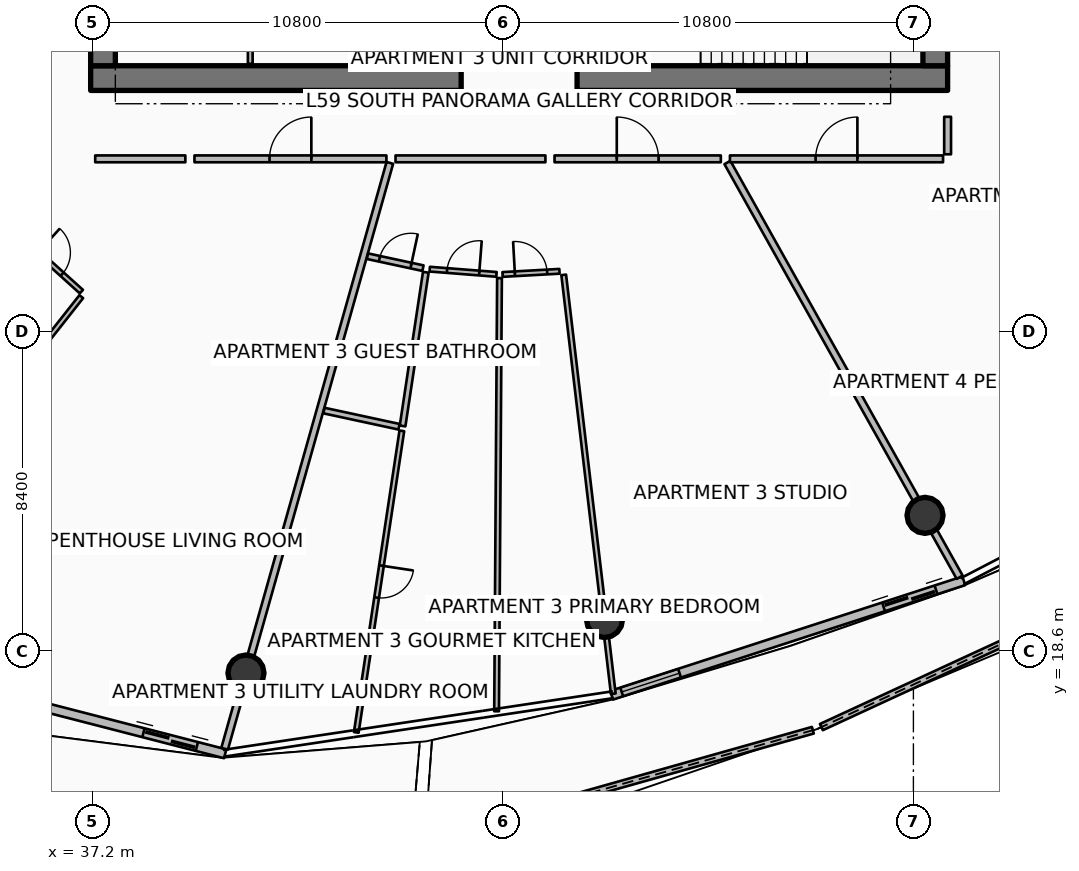
"""IFC4 building model, lengths in metres.
Left out: names, types, materials, properties, quantities, classifications, styles, units other than length and angle.
Written with IfcOpenShell. Run it as: python <this file> out.ifc"""

import sys

from ifc_helpers import new_model, si_unit, direction, frame, frame_2d, origin, origin_2d, place, context, subcontext, project, spatial, polyline, rectangle, circle, outline, extrude, element, fill, save


model = new_model("IFC4")
c1 = context("Model", 3, precision=1e-05, world=origin(), true_north=direction((0.0, 1.0)))
c2 = subcontext(c1, "Body", "Model", "MODEL_VIEW")
j1 = project(units=[si_unit("LENGTHUNIT", "METRE"), si_unit("PLANEANGLEUNIT", "RADIAN")], contexts=[c1])
p1 = place(None, origin())
s1 = spatial("IfcSite", under=j1, at=p1, CompositionType="ELEMENT")
p2 = place(p1, origin())
s2 = spatial("IfcBuilding", under=s1, at=p2, CompositionType="ELEMENT")
p3 = place(p2, frame((0.0, 0.0, 236.7)))
s3 = spatial("IfcBuildingStorey", under=s2, at=p3, CompositionType="ELEMENT", Elevation=236.7)
for number, where, z_axis, x_axis in (
    (1, (37.15, 33.675, 0.0), (0.0, 0.0, 1.0), (1.0, 0.0, 0.0)),
    (2, (49.95, 33.675, 0.0), (0.0, 0.0, 1.0), (1.0, 0.0, 0.0)),
):
    element("IfcWall", number, at=place(p3, frame(where, z_axis=z_axis, x_axis=x_axis)), inside=s3, PredefinedType="SHEAR", context=c2, shape_type="SweptSolid", body=[
        extrude(rectangle(XDim=9.75, YDim=0.65, at=frame_2d((4.875, 0.0))), origin(), (0.0, 0.0, 1.0), 3.85),
    ])
for number, where, z_axis, x_axis in (
    (3, (37.475, 34.0, 0.0), (0.0, 0.0, 1.0), (0.0, 1.0, 0.0)),
    (4, (59.375, 34.0, 0.0), (0.0, 0.0, 1.0), (0.0, 1.0, 0.0)),
):
    element("IfcWall", number, at=place(p3, frame(where, z_axis=z_axis, x_axis=x_axis)), inside=s3, PredefinedType="SHEAR", context=c2, shape_type="SweptSolid", body=[
        extrude(rectangle(XDim=16.0, YDim=0.65, at=frame_2d((8.0, 0.0))), origin(), (0.0, 0.0, 1.0), 3.85),
    ])
p4 = place(p3, frame((51.31, 34.0, 0.0), z_axis=(0.0, 0.0, 1.0), x_axis=(0.0, 1.0, 0.0)))
e5 = element("IfcWall", 5, at=p4, inside=s3, PredefinedType="SHEAR", context=c2, shape_type="SweptSolid", body=[
    extrude(rectangle(XDim=3.5, YDim=0.28, at=frame_2d((1.75, 0.0))), origin(), (0.0, 0.0, 1.0), 3.85),
])
for number, where, z_axis, x_axis in (
    (6, (41.237, 18.021, 0.0), (0.0, 0.0, 1.0), (1.0, 0.0, 0.0)),
    (7, (50.671, 19.429, 0.0), (0.0, 0.0, 1.0), (1.0, 0.0, 0.0)),
    (8, (59.105, 22.17, 0.0), (0.0, 0.0, 1.0), (1.0, 0.0, 0.0)),
):
    element("IfcColumn", number, at=place(p3, frame(where, z_axis=z_axis, x_axis=x_axis)), inside=s3, PredefinedType="COLUMN", context=c2, shape_type="SweptSolid", body=[
        extrude(circle(Radius=0.475, at=origin_2d()), origin(), (0.0, 0.0, 1.0), 3.59),
    ])
p5 = place(p3, frame((45.942, 13.635, 0.0), z_axis=(0.0, 0.0, 1.0), x_axis=(0.962462930889, 0.271413165976, 0.0)))
e9 = element("IfcWall", 9, at=p5, inside=s3, PredefinedType="PARAPET", context=c2, shape_type="SweptSolid", body=[
    extrude(outline(polyline([(0.0, 0.0), (10.611, 0.0), (10.611, 1.632), (5.305, 1.798), (0.0, 1.86), (0.0, 0.0)])), frame((0.0, 0.09, 0.0), z_axis=(0.0, -1.0, 0.0), x_axis=(1.0, 0.0, 0.0)), (0.0, 0.0, 1.0), 0.18),
])
p6 = place(p3, frame((56.379, 16.598, 0.0), z_axis=(0.0, 0.0, 1.0), x_axis=(0.907848132744, 0.419299138888, 0.0)))
e10 = element("IfcWall", 10, at=p6, inside=s3, PredefinedType="PARAPET", context=c2, shape_type="SweptSolid", body=[
    extrude(outline(polyline([(0.0, 0.0), (10.344, 0.0), (10.344, 1.233), (5.172, 1.418), (0.0, 1.632), (0.0, 0.0)])), frame((0.0, 0.09, 0.0), z_axis=(0.0, -1.0, 0.0), x_axis=(1.0, 0.0, 0.0)), (0.0, 0.0, 1.0), 0.18),
])
p7 = place(p3, frame((29.614, 18.751, 0.0), z_axis=(0.0, 0.0, 1.0), x_axis=(0.968343758421, -0.249620442927, 0.0)))
e11 = element("IfcWall", 11, at=p7, inside=s3, PredefinedType="SOLIDWALL", context=c2, shape_type="SweptSolid", body=[
    extrude(rectangle(XDim=11.438, YDim=0.24, at=frame_2d((5.719, 0.0))), origin(), (0.0, 0.0, 1.0), 2.54),
])
p8 = place(p7, frame((9.218, 0.0, 0.0)))
e12 = element("IfcOpeningElement", 12, at=p8, cuts=e11, PredefinedType="OPENING", context=c2, shape_type="SweptSolid", body=[
    extrude(rectangle(XDim=1.45, YDim=2.15, at=frame_2d((0.725, 1.075))), frame((0.0, 0.13, 0.0), z_axis=(0.0, -1.0, 0.0), x_axis=(1.0, 0.0, 0.0)), (0.0, 0.0, 1.0), 0.26),
])
p9 = place(p7, frame((0.28, 0.0, 0.65)))
e13 = element("IfcOpeningElement", 13, at=p9, cuts=e11, PredefinedType="OPENING", context=c2, shape_type="SweptSolid", body=[
    extrude(rectangle(XDim=1.6, YDim=1.5, at=frame_2d((0.8, 0.75))), frame((0.0, 0.13, 0.0), z_axis=(0.0, -1.0, 0.0), x_axis=(1.0, 0.0, 0.0)), (0.0, 0.0, 1.0), 0.26),
])
p10 = place(p3, frame((50.858, 17.436, 0.0), z_axis=(0.0, 0.0, 1.0), x_axis=(0.951055974609, 0.309018661507, 0.0)))
e14 = element("IfcWall", 14, at=p10, inside=s3, PredefinedType="SOLIDWALL", context=c2, shape_type="SweptSolid", body=[
    extrude(rectangle(XDim=9.745, YDim=0.24, at=frame_2d((4.873, 0.0))), origin(), (0.0, 0.0, 1.0), 2.54),
])
p11 = place(p10, frame((7.525, 0.0, 0.0)))
e15 = element("IfcOpeningElement", 15, at=p11, cuts=e14, PredefinedType="OPENING", context=c2, shape_type="SweptSolid", body=[
    extrude(rectangle(XDim=1.45, YDim=2.15, at=frame_2d((0.725, 1.075))), frame((0.0, 0.13, 0.0), z_axis=(0.0, -1.0, 0.0), x_axis=(1.0, 0.0, 0.0)), (0.0, 0.0, 1.0), 0.26),
])
p12 = place(p10, frame((0.28, 0.0, 0.65)))
e16 = element("IfcOpeningElement", 16, at=p12, cuts=e14, PredefinedType="OPENING", context=c2, shape_type="SweptSolid", body=[
    extrude(rectangle(XDim=1.6, YDim=1.5, at=frame_2d((0.8, 0.75))), frame((0.0, 0.13, 0.0), z_axis=(0.0, -1.0, 0.0), x_axis=(1.0, 0.0, 0.0)), (0.0, 0.0, 1.0), 0.26),
])
p13 = place(p3, frame((46.58, 34.245, 0.0), z_axis=(0.0, 0.0, 1.0), x_axis=(0.0, 1.0, 0.0)))
e17 = element("IfcWall", 17, at=p13, inside=s3, PredefinedType="PARTITIONING", context=c2, shape_type="SweptSolid", body=[
    extrude(rectangle(XDim=1.71, YDim=0.16, at=frame_2d((0.855, 0.0))), origin(), (0.0, 0.0, 1.0), 3.59),
])
for number, where, z_axis, x_axis in (
    (18, (44.28, 34.05, 0.0), (0.0, 0.0, 1.0), (0.0, 1.0, 0.0)),
    (19, (41.35, 34.05, 0.0), (0.0, 0.0, 1.0), (0.0, 1.0, 0.0)),
):
    element("IfcWall", number, at=place(p3, frame(where, z_axis=z_axis, x_axis=x_axis)), inside=s3, PredefinedType="PARTITIONING", context=c2, shape_type="SweptSolid", body=[
        extrude(rectangle(XDim=2.03, YDim=0.125, at=frame_2d((1.015, 0.0))), origin(), (0.0, 0.0, 1.0), 3.03),
    ])
p14 = place(p3, frame((49.98, 34.06, 0.0), z_axis=(0.0, 0.0, 1.0), x_axis=(0.0, 1.0, 0.0)))
e20 = element("IfcWall", 20, at=p14, inside=s3, PredefinedType="PARTITIONING", context=c2, shape_type="SweptSolid", body=[
    extrude(rectangle(XDim=3.4, YDim=0.125, at=frame_2d((1.7, 0.0))), origin(), (0.0, 0.0, 1.0), 3.03),
])
p15 = place(p3, frame((45.023, 31.444, 0.0), z_axis=(0.0, 0.0, 1.0), x_axis=(-0.271442063103, -0.962454781472, 0.0)))
e21 = element("IfcWall", 21, at=p15, inside=s3, PredefinedType="PARTITIONING", context=c2, shape_type="SweptSolid", body=[
    extrude(rectangle(XDim=16.017, YDim=0.18, at=frame_2d((8.008, 0.0))), origin(), (0.0, 0.0, 1.0), 2.957),
])
p16 = place(p3, frame((53.906, 31.454, 0.0), z_axis=(0.0, 0.0, 1.0), x_axis=(0.48862654941, -0.872493034477, 0.0)))
e22 = element("IfcWall", 22, at=p16, inside=s3, PredefinedType="PARTITIONING", context=c2, shape_type="SweptSolid", body=[
    extrude(rectangle(XDim=12.508, YDim=0.18, at=frame_2d((6.254, 0.0))), origin(), (0.0, 0.0, 1.0), 2.957),
])
p17 = place(p3, frame((39.882, 31.55, 0.0), z_axis=(0.0, 0.0, 1.0), x_axis=(1.0, 0.0, 0.0)))
e23 = element("IfcWall", 23, at=p17, inside=s3, PredefinedType="PARTITIONING", context=c2, shape_type="SweptSolid", body=[
    extrude(rectangle(XDim=5.051, YDim=0.18, at=frame_2d((2.525, 0.0))), origin(), (0.0, 0.0, 1.0), 2.957),
])
p18 = place(p17, frame((1.975, 0.0, 0.0)))
e24 = element("IfcOpeningElement", 24, at=p18, cuts=e23, PredefinedType="OPENING", context=c2, shape_type="SweptSolid", body=[
    extrude(rectangle(XDim=1.1, YDim=2.1, at=frame_2d((0.55, 1.05))), frame((0.0, 0.1, 0.0), z_axis=(0.0, -1.0, 0.0), x_axis=(1.0, 0.0, 0.0)), (0.0, 0.0, 1.0), 0.2),
])
p19 = place(p3, frame((37.27, 31.55, 0.0), z_axis=(0.0, 0.0, 1.0), x_axis=(1.0, 0.0, 0.0)))
e25 = element("IfcWall", 25, at=p19, inside=s3, PredefinedType="PARTITIONING", context=c2, shape_type="SweptSolid", body=[
    extrude(rectangle(XDim=2.372, YDim=0.18, at=frame_2d((1.186, 0.0))), origin(), (0.0, 0.0, 1.0), 2.957),
])
p20 = place(p3, frame((36.903, 27.924, 0.0), z_axis=(0.0, 0.0, 1.0), x_axis=(-0.619090039254, -0.785320013304, 0.0)))
e26 = element("IfcWall", 26, at=p20, inside=s3, PredefinedType="PARTITIONING", context=c2, shape_type="SweptSolid", body=[
    extrude(rectangle(XDim=11.672, YDim=0.125, at=frame_2d((5.836, 0.0))), origin(), (0.0, 0.0, 1.0), 2.957),
])
p21 = place(p3, frame((35.26, 29.542, 0.0), z_axis=(0.0, 0.0, 1.0), x_axis=(0.742286289791, -0.670082878447, 0.0)))
e27 = element("IfcWall", 27, at=p21, inside=s3, PredefinedType="PARTITIONING", context=c2, shape_type="SweptSolid", body=[
    extrude(rectangle(XDim=2.218, YDim=0.125, at=frame_2d((1.109, 0.0))), origin(), (0.0, 0.0, 1.0), 2.957),
])
p22 = place(p21, frame((0.684, 0.0, 0.0)))
e28 = element("IfcOpeningElement", 28, at=p22, cuts=e27, PredefinedType="OPENING", context=c2, shape_type="SweptSolid", body=[
    extrude(rectangle(XDim=0.85, YDim=2.06, at=frame_2d((0.425, 1.03))), frame((0.0, 0.073, 0.0), z_axis=(0.0, -1.0, 0.0), x_axis=(1.0, 0.0, 0.0)), (0.0, 0.0, 1.0), 0.145),
])
p23 = place(p3, frame((49.357, 31.55, 0.0), z_axis=(0.0, 0.0, 1.0), x_axis=(1.0, 0.0, 0.0)))
e29 = element("IfcWall", 29, at=p23, inside=s3, PredefinedType="PARTITIONING", context=c2, shape_type="SweptSolid", body=[
    extrude(rectangle(XDim=4.376, YDim=0.18, at=frame_2d((2.188, 0.0))), origin(), (0.0, 0.0, 1.0), 2.957),
])
p24 = place(p23, frame((1.638, 0.0, 0.0)))
e30 = element("IfcOpeningElement", 30, at=p24, cuts=e29, PredefinedType="OPENING", context=c2, shape_type="SweptSolid", body=[
    extrude(rectangle(XDim=1.1, YDim=2.1, at=frame_2d((0.55, 1.05))), frame((0.0, 0.1, 0.0), z_axis=(0.0, -1.0, 0.0), x_axis=(1.0, 0.0, 0.0)), (0.0, 0.0, 1.0), 0.2),
])
p25 = place(p3, frame((45.173, 31.55, 0.0), z_axis=(0.0, 0.0, 1.0), x_axis=(1.0, 0.0, 0.0)))
e31 = element("IfcWall", 31, at=p25, inside=s3, PredefinedType="PARTITIONING", context=c2, shape_type="SweptSolid", body=[
    extrude(rectangle(XDim=3.944, YDim=0.18, at=frame_2d((1.972, 0.0))), origin(), (0.0, 0.0, 1.0), 2.957),
])
p26 = place(p3, frame((49.598, 28.497, 0.0), z_axis=(0.0, 0.0, 1.0), x_axis=(0.117541965763, -0.99306791625, 0.0)))
e32 = element("IfcWall", 32, at=p26, inside=s3, PredefinedType="PARTITIONING", context=c2, shape_type="SweptSolid", body=[
    extrude(rectangle(XDim=11.098, YDim=0.125, at=frame_2d((5.549, 0.0))), origin(), (0.0, 0.0, 1.0), 2.957),
])
p27 = place(p3, frame((44.434, 28.989, 0.0), z_axis=(0.0, 0.0, 1.0), x_axis=(0.977543483976, -0.21073380587, 0.0)))
e33 = element("IfcWall", 33, at=p27, inside=s3, PredefinedType="PARTITIONING", context=c2, shape_type="SweptSolid", body=[
    extrude(rectangle(XDim=1.494, YDim=0.15, at=frame_2d((0.747, 0.0))), origin(), (0.0, 0.0, 1.0), 2.957),
])
p28 = place(p27, frame((0.322, 0.0, 0.0)))
e34 = element("IfcOpeningElement", 34, at=p28, cuts=e33, PredefinedType="OPENING", context=c2, shape_type="SweptSolid", body=[
    extrude(rectangle(XDim=0.85, YDim=2.06, at=frame_2d((0.425, 1.03))), frame((0.0, 0.085, 0.0), z_axis=(0.0, -1.0, 0.0), x_axis=(1.0, 0.0, 0.0)), (0.0, 0.0, 1.0), 0.17),
])
p29 = place(p3, frame((43.289, 24.927, 0.0), z_axis=(0.0, 0.0, 1.0), x_axis=(0.977523973404, -0.210824290395, 0.0)))
e35 = element("IfcWall", 35, at=p29, inside=s3, PredefinedType="PARTITIONING", context=c2, shape_type="SweptSolid", body=[
    extrude(rectangle(XDim=2.021, YDim=0.15, at=frame_2d((1.01, 0.0))), origin(), (0.0, 0.0, 1.0), 2.957),
])
p30 = place(p3, frame((45.969, 28.566, 0.0), z_axis=(0.0, 0.0, 1.0), x_axis=(-0.149464107942, -0.988767151779, 0.0)))
e36 = element("IfcWall", 36, at=p30, inside=s3, PredefinedType="PARTITIONING", context=c2, shape_type="SweptSolid", body=[
    extrude(rectangle(XDim=4.09, YDim=0.15, at=frame_2d((2.045, 0.0))), origin(), (0.0, 0.0, 1.0), 3.03),
])
p31 = place(p3, frame((45.339, 24.393, 0.0), z_axis=(0.0, 0.0, 1.0), x_axis=(-0.149441267911, -0.988770604056, 0.0)))
e37 = element("IfcWall", 37, at=p31, inside=s3, PredefinedType="PARTITIONING", context=c2, shape_type="SweptSolid", body=[
    extrude(rectangle(XDim=8.025, YDim=0.125, at=frame_2d((4.012, 0.0))), origin(), (0.0, 0.0, 1.0), 3.03),
])
p32 = place(p31, frame((3.587, 0.0, 0.0)))
e38 = element("IfcOpeningElement", 38, at=p32, cuts=e37, PredefinedType="OPENING", context=c2, shape_type="SweptSolid", body=[
    extrude(rectangle(XDim=0.85, YDim=2.06, at=frame_2d((0.425, 1.03))), frame((0.0, 0.073, 0.0), z_axis=(0.0, -1.0, 0.0), x_axis=(1.0, 0.0, 0.0)), (0.0, 0.0, 1.0), 0.145),
])
p33 = place(p3, frame((47.909, 28.413, 0.0), z_axis=(0.0, 0.0, 1.0), x_axis=(-0.006746473149, -0.999977242291, 0.0)))
e39 = element("IfcWall", 39, at=p33, inside=s3, PredefinedType="PARTITIONING", context=c2, shape_type="SweptSolid", body=[
    extrude(rectangle(XDim=11.399, YDim=0.125, at=frame_2d((5.7, 0.0))), origin(), (0.0, 0.0, 1.0), 3.03),
])
p34 = place(p3, frame((46.073, 28.648, 0.0), z_axis=(0.0, 0.0, 1.0), x_axis=(0.996920989634, -0.078412629257, 0.0)))
e40 = element("IfcWall", 40, at=p34, inside=s3, PredefinedType="PARTITIONING", context=c2, shape_type="SweptSolid", body=[
    extrude(rectangle(XDim=1.762, YDim=0.125, at=frame_2d((0.881, 0.0))), origin(), (0.0, 0.0, 1.0), 3.03),
])
p35 = place(p34, frame((0.456, 0.0, 0.0)))
e41 = element("IfcOpeningElement", 41, at=p35, cuts=e40, PredefinedType="OPENING", context=c2, shape_type="SweptSolid", body=[
    extrude(rectangle(XDim=0.85, YDim=2.06, at=frame_2d((0.425, 1.03))), frame((0.0, 0.073, 0.0), z_axis=(0.0, -1.0, 0.0), x_axis=(1.0, 0.0, 0.0)), (0.0, 0.0, 1.0), 0.145),
])
p36 = place(p3, frame((47.989, 28.508, 0.0), z_axis=(0.0, 0.0, 1.0), x_axis=(0.998458349177, 0.055506080383, 0.0)))
e42 = element("IfcWall", 42, at=p36, inside=s3, PredefinedType="PARTITIONING", context=c2, shape_type="SweptSolid", body=[
    extrude(rectangle(XDim=1.5, YDim=0.125, at=frame_2d((0.75, 0.0))), origin(), (0.0, 0.0, 1.0), 3.03),
])
p37 = place(p36, frame((0.325, 0.0, 0.0)))
e43 = element("IfcOpeningElement", 43, at=p37, cuts=e42, PredefinedType="OPENING", context=c2, shape_type="SweptSolid", body=[
    extrude(rectangle(XDim=0.85, YDim=2.06, at=frame_2d((0.425, 1.03))), frame((0.0, 0.073, 0.0), z_axis=(0.0, -1.0, 0.0), x_axis=(1.0, 0.0, 0.0)), (0.0, 0.0, 1.0), 0.145),
])
p38 = place(p3, frame((53.972, 31.55, 0.0), z_axis=(0.0, 0.0, 1.0), x_axis=(1.0, 0.0, 0.0)))
e44 = element("IfcWall", 44, at=p38, inside=s3, PredefinedType="PARTITIONING", context=c2, shape_type="SweptSolid", body=[
    extrude(rectangle(XDim=5.608, YDim=0.18, at=frame_2d((2.804, 0.0))), origin(), (0.0, 0.0, 1.0), 2.957),
])
p39 = place(p38, frame((2.254, 0.0, 0.0)))
e45 = element("IfcOpeningElement", 45, at=p39, cuts=e44, PredefinedType="OPENING", context=c2, shape_type="SweptSolid", body=[
    extrude(rectangle(XDim=1.1, YDim=2.1, at=frame_2d((0.55, 1.05))), frame((0.0, 0.1, 0.0), z_axis=(0.0, -1.0, 0.0), x_axis=(1.0, 0.0, 0.0)), (0.0, 0.0, 1.0), 0.2),
])
p40 = place(p3, frame((59.7, 31.67, 0.0), z_axis=(0.0, 0.0, 1.0), x_axis=(0.0, 1.0, 0.0)))
e46 = element("IfcWall", 46, at=p40, inside=s3, PredefinedType="PARTITIONING", context=c2, shape_type="SweptSolid", body=[
    extrude(rectangle(XDim=0.987, YDim=0.18, at=frame_2d((0.493, 0.0))), origin(), (0.0, 0.0, 1.0), 2.957),
])
p41 = place(p8, origin())
e47 = element("IfcDoor", 47, at=p41, inside=s3, OperationType="DOUBLE_DOOR_SLIDING", PredefinedType="DOOR", context=c2, shape_type="SweptSolid", body=[
    extrude(rectangle(XDim=1.45, YDim=2.15, at=frame_2d((0.725, 1.075))), frame((0.0, 0.025, 0.0), z_axis=(0.0, -1.0, 0.0), x_axis=(1.0, 0.0, 0.0)), (0.0, 0.0, 1.0), 0.05),
])
fill(e12, e47)
p42 = place(p11, origin())
e48 = element("IfcDoor", 48, at=p42, inside=s3, OperationType="DOUBLE_DOOR_SLIDING", PredefinedType="DOOR", context=c2, shape_type="SweptSolid", body=[
    extrude(rectangle(XDim=1.45, YDim=2.15, at=frame_2d((0.725, 1.075))), frame((0.0, 0.025, 0.0), z_axis=(0.0, -1.0, 0.0), x_axis=(1.0, 0.0, 0.0)), (0.0, 0.0, 1.0), 0.05),
])
fill(e15, e48)
p43 = place(p12, origin())
e49 = element("IfcWindow", 49, at=p43, inside=s3, PartitioningType="SINGLE_PANEL", PredefinedType="WINDOW", context=c2, shape_type="SweptSolid", body=[
    extrude(rectangle(XDim=1.6, YDim=1.5, at=frame_2d((0.8, 0.75))), frame((0.0, 0.03, 0.0), z_axis=(0.0, -1.0, 0.0), x_axis=(1.0, 0.0, 0.0)), (0.0, 0.0, 1.0), 0.06),
])
fill(e16, e49)
p44 = place(p18, origin())
e50 = element("IfcDoor", 50, at=p44, inside=s3, OperationType="SINGLE_SWING_RIGHT", PredefinedType="DOOR", context=c2, shape_type="SweptSolid", body=[
    extrude(rectangle(XDim=1.1, YDim=2.1, at=frame_2d((0.55, 1.05))), frame((0.0, 0.025, 0.0), z_axis=(0.0, -1.0, 0.0), x_axis=(1.0, 0.0, 0.0)), (0.0, 0.0, 1.0), 0.05),
])
fill(e24, e50)
p45 = place(p22, origin())
e51 = element("IfcDoor", 51, at=p45, inside=s3, OperationType="SINGLE_SWING_LEFT", PredefinedType="DOOR", context=c2, shape_type="SweptSolid", body=[
    extrude(rectangle(XDim=0.85, YDim=2.06, at=frame_2d((0.425, 1.03))), frame((0.0, 0.025, 0.0), z_axis=(0.0, -1.0, 0.0), x_axis=(1.0, 0.0, 0.0)), (0.0, 0.0, 1.0), 0.05),
])
fill(e28, e51)
p46 = place(p24, origin())
e52 = element("IfcDoor", 52, at=p46, inside=s3, OperationType="SINGLE_SWING_LEFT", PredefinedType="DOOR", context=c2, shape_type="SweptSolid", body=[
    extrude(rectangle(XDim=1.1, YDim=2.1, at=frame_2d((0.55, 1.05))), frame((0.0, 0.025, 0.0), z_axis=(0.0, -1.0, 0.0), x_axis=(1.0, 0.0, 0.0)), (0.0, 0.0, 1.0), 0.05),
])
fill(e30, e52)
p47 = place(p28, origin())
e53 = element("IfcDoor", 53, at=p47, inside=s3, OperationType="SINGLE_SWING_RIGHT", PredefinedType="DOOR", context=c2, shape_type="SweptSolid", body=[
    extrude(rectangle(XDim=0.85, YDim=2.06, at=frame_2d((0.425, 1.03))), frame((0.0, 0.025, 0.0), z_axis=(0.0, -1.0, 0.0), x_axis=(1.0, 0.0, 0.0)), (0.0, 0.0, 1.0), 0.05),
])
fill(e34, e53)
p48 = place(p32, origin())
e54 = element("IfcDoor", 54, at=p48, inside=s3, OperationType="SINGLE_SWING_LEFT", PredefinedType="DOOR", context=c2, shape_type="SweptSolid", body=[
    extrude(rectangle(XDim=0.85, YDim=2.06, at=frame_2d((0.425, 1.03))), frame((0.0, 0.025, 0.0), z_axis=(0.0, -1.0, 0.0), x_axis=(1.0, 0.0, 0.0)), (0.0, 0.0, 1.0), 0.05),
])
fill(e38, e54)
p49 = place(p35, origin())
e55 = element("IfcDoor", 55, at=p49, inside=s3, OperationType="SINGLE_SWING_RIGHT", PredefinedType="DOOR", context=c2, shape_type="SweptSolid", body=[
    extrude(rectangle(XDim=0.85, YDim=2.06, at=frame_2d((0.425, 1.03))), frame((0.0, 0.025, 0.0), z_axis=(0.0, -1.0, 0.0), x_axis=(1.0, 0.0, 0.0)), (0.0, 0.0, 1.0), 0.05),
])
fill(e41, e55)
p50 = place(p37, origin())
e56 = element("IfcDoor", 56, at=p50, inside=s3, OperationType="SINGLE_SWING_LEFT", PredefinedType="DOOR", context=c2, shape_type="SweptSolid", body=[
    extrude(rectangle(XDim=0.85, YDim=2.06, at=frame_2d((0.425, 1.03))), frame((0.0, 0.025, 0.0), z_axis=(0.0, -1.0, 0.0), x_axis=(1.0, 0.0, 0.0)), (0.0, 0.0, 1.0), 0.05),
])
fill(e43, e56)
p51 = place(p39, origin())
e57 = element("IfcDoor", 57, at=p51, inside=s3, OperationType="SINGLE_SWING_RIGHT", PredefinedType="DOOR", context=c2, shape_type="SweptSolid", body=[
    extrude(rectangle(XDim=1.1, YDim=2.1, at=frame_2d((0.55, 1.05))), frame((0.0, 0.025, 0.0), z_axis=(0.0, -1.0, 0.0), x_axis=(1.0, 0.0, 0.0)), (0.0, 0.0, 1.0), 0.05),
])
fill(e45, e57)
save(model, sys.argv[1])
